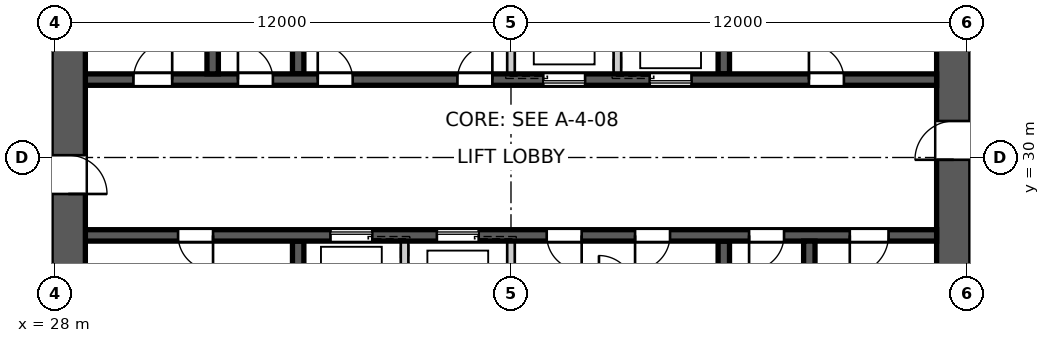
"""IFC4 building model, lengths in metres.
Left out: names, types, materials, properties, quantities, classifications, styles, units other than length and angle.
Written with IfcOpenShell. Run it as: python <this file> out.ifc"""

import sys

from ifc_helpers import new_model, si_unit, direction, frame, frame_2d, origin, place, context, subcontext, project, spatial, polyline, rectangle, outline, extrude, element, fill, save


model = new_model("IFC4")
c1 = context("Model", 3, precision=1e-05, world=origin(), true_north=direction((0.0, 1.0)))
c2 = subcontext(c1, "Body", "Model", "MODEL_VIEW")
j1 = project(units=[si_unit("LENGTHUNIT", "METRE"), si_unit("PLANEANGLEUNIT", "RADIAN")], contexts=[c1])
p1 = place(None, origin())
s1 = spatial("IfcSite", under=j1, at=p1, CompositionType="ELEMENT")
p2 = place(p1, origin())
s2 = spatial("IfcBuilding", under=s1, at=p2, CompositionType="ELEMENT")
p3 = place(p2, frame((0.0, 0.0, 264.2)))
s3 = spatial("IfcBuildingStorey", under=s2, at=p3, CompositionType="ELEMENT", Elevation=264.2)
p4 = place(p3, frame((51.65, 18.8, 0.0), z_axis=(0.0, 0.0, 1.0), x_axis=(0.0, 1.0, 0.0)))
e1 = element("IfcWall", 1, at=p4, inside=s3, PredefinedType="SHEAR", context=c2, shape_type="SweptSolid", body=[
    extrude(outline(polyline([(0.0, -0.45), (22.4, -0.45), (22.4, -0.025), (22.85, -0.025), (22.85, 0.025), (22.4, 0.025), (22.4, 0.45), (0.0, 0.45), (0.0, 0.025), (-0.45, 0.025), (-0.45, -0.025), (0.0, -0.025), (0.0, -0.45)])), origin(), (0.0, 0.0, 1.0), 3.4),
])
p5 = place(p4, frame((11.14, 0.0, 0.0)))
e2 = element("IfcOpeningElement", 2, at=p5, cuts=e1, PredefinedType="OPENING", context=c2, shape_type="SweptSolid", body=[
    extrude(rectangle(XDim=1.02, YDim=2.4, at=frame_2d((0.51, 1.2))), frame((0.0, 0.46, 0.0), z_axis=(0.0, -1.0, 0.0), x_axis=(1.0, 0.0, 0.0)), (0.0, 0.0, 1.0), 0.92),
])
p6 = place(p3, frame((28.35, 41.2, 0.0), z_axis=(0.0, 0.0, 1.0), x_axis=(0.0, -1.0, 0.0)))
e3 = element("IfcWall", 3, at=p6, inside=s3, PredefinedType="SHEAR", context=c2, shape_type="SweptSolid", body=[
    extrude(outline(polyline([(0.0, -0.45), (22.4, -0.45), (22.4, -0.025), (22.85, -0.025), (22.85, 0.025), (22.4, 0.025), (22.4, 0.45), (0.0, 0.45), (0.0, 0.025), (-0.45, 0.025), (-0.45, -0.025), (0.0, -0.025), (0.0, -0.45)])), origin(), (0.0, 0.0, 1.0), 3.4),
])
p7 = place(p6, frame((11.14, 0.0, 0.0)))
e4 = element("IfcOpeningElement", 4, at=p7, cuts=e3, PredefinedType="OPENING", context=c2, shape_type="SweptSolid", body=[
    extrude(rectangle(XDim=1.02, YDim=2.4, at=frame_2d((0.51, 1.2))), frame((0.0, 0.46, 0.0), z_axis=(0.0, -1.0, 0.0), x_axis=(1.0, 0.0, 0.0)), (0.0, 0.0, 1.0), 0.92),
])
p8 = place(p3, frame((28.8, 32.05, 0.0), z_axis=(0.0, 0.0, 1.0), x_axis=(1.0, 0.0, 0.0)))
e5 = element("IfcWall", 5, at=p8, inside=s3, PredefinedType="SHEAR", context=c2, shape_type="SweptSolid", body=[
    extrude(rectangle(XDim=22.4, YDim=0.3, at=frame_2d((11.2, 0.0))), origin(), (0.0, 0.0, 1.0), 3.4),
])
p9 = place(p8, frame((19.04, 0.0, 0.0)))
e6 = element("IfcOpeningElement", 6, at=p9, cuts=e5, PredefinedType="OPENING", context=c2, shape_type="SweptSolid", body=[
    extrude(rectangle(XDim=0.92, YDim=2.1, at=frame_2d((0.46, 1.05))), frame((0.0, 0.16, 0.0), z_axis=(0.0, -1.0, 0.0), x_axis=(1.0, 0.0, 0.0)), (0.0, 0.0, 1.0), 0.32),
])
p10 = place(p8, frame((1.265, 0.0, 0.0)))
e7 = element("IfcOpeningElement", 7, at=p10, cuts=e5, PredefinedType="OPENING", context=c2, shape_type="SweptSolid", body=[
    extrude(rectangle(XDim=1.02, YDim=2.1, at=frame_2d((0.51, 1.05))), frame((0.0, 0.16, 0.0), z_axis=(0.0, -1.0, 0.0), x_axis=(1.0, 0.0, 0.0)), (0.0, 0.0, 1.0), 0.32),
])
p11 = place(p8, frame((4.015, 0.0, 0.0)))
e8 = element("IfcOpeningElement", 8, at=p11, cuts=e5, PredefinedType="OPENING", context=c2, shape_type="SweptSolid", body=[
    extrude(rectangle(XDim=0.92, YDim=2.1, at=frame_2d((0.46, 1.05))), frame((0.0, 0.16, 0.0), z_axis=(0.0, -1.0, 0.0), x_axis=(1.0, 0.0, 0.0)), (0.0, 0.0, 1.0), 0.32),
])
p12 = place(p8, frame((6.115, 0.0, 0.0)))
e9 = element("IfcOpeningElement", 9, at=p12, cuts=e5, PredefinedType="OPENING", context=c2, shape_type="SweptSolid", body=[
    extrude(rectangle(XDim=0.92, YDim=2.1, at=frame_2d((0.46, 1.05))), frame((0.0, 0.16, 0.0), z_axis=(0.0, -1.0, 0.0), x_axis=(1.0, 0.0, 0.0)), (0.0, 0.0, 1.0), 0.32),
])
p13 = place(p8, frame((9.79, 0.0, 0.0)))
e10 = element("IfcOpeningElement", 10, at=p13, cuts=e5, PredefinedType="OPENING", context=c2, shape_type="SweptSolid", body=[
    extrude(rectangle(XDim=0.92, YDim=2.1, at=frame_2d((0.46, 1.05))), frame((0.0, 0.16, 0.0), z_axis=(0.0, -1.0, 0.0), x_axis=(1.0, 0.0, 0.0)), (0.0, 0.0, 1.0), 0.32),
])
p14 = place(p8, frame((12.05, 0.0, 0.0)))
e11 = element("IfcOpeningElement", 11, at=p14, cuts=e5, PredefinedType="OPENING", context=c2, shape_type="SweptSolid", body=[
    extrude(rectangle(XDim=1.1, YDim=2.1, at=frame_2d((0.55, 1.05))), frame((0.0, 0.16, 0.0), z_axis=(0.0, -1.0, 0.0), x_axis=(1.0, 0.0, 0.0)), (0.0, 0.0, 1.0), 0.32),
])
p15 = place(p8, frame((14.85, 0.0, 0.0)))
e12 = element("IfcOpeningElement", 12, at=p15, cuts=e5, PredefinedType="OPENING", context=c2, shape_type="SweptSolid", body=[
    extrude(rectangle(XDim=1.1, YDim=2.1, at=frame_2d((0.55, 1.05))), frame((0.0, 0.16, 0.0), z_axis=(0.0, -1.0, 0.0), x_axis=(1.0, 0.0, 0.0)), (0.0, 0.0, 1.0), 0.32),
])
p16 = place(p3, frame((51.2, 27.95, 0.0), z_axis=(0.0, 0.0, 1.0), x_axis=(-1.0, 0.0, 0.0)))
e13 = element("IfcWall", 13, at=p16, inside=s3, PredefinedType="SHEAR", context=c2, shape_type="SweptSolid", body=[
    extrude(rectangle(XDim=22.4, YDim=0.3, at=frame_2d((11.2, 0.0))), origin(), (0.0, 0.0, 1.0), 3.4),
])
p17 = place(p16, frame((19.04, 0.0, 0.0)))
e14 = element("IfcOpeningElement", 14, at=p17, cuts=e13, PredefinedType="OPENING", context=c2, shape_type="SweptSolid", body=[
    extrude(rectangle(XDim=0.92, YDim=2.1, at=frame_2d((0.46, 1.05))), frame((0.0, 0.16, 0.0), z_axis=(0.0, -1.0, 0.0), x_axis=(1.0, 0.0, 0.0)), (0.0, 0.0, 1.0), 0.32),
])
p18 = place(p16, frame((1.265, 0.0, 0.0)))
e15 = element("IfcOpeningElement", 15, at=p18, cuts=e13, PredefinedType="OPENING", context=c2, shape_type="SweptSolid", body=[
    extrude(rectangle(XDim=1.02, YDim=2.1, at=frame_2d((0.51, 1.05))), frame((0.0, 0.16, 0.0), z_axis=(0.0, -1.0, 0.0), x_axis=(1.0, 0.0, 0.0)), (0.0, 0.0, 1.0), 0.32),
])
p19 = place(p16, frame((4.015, 0.0, 0.0)))
e16 = element("IfcOpeningElement", 16, at=p19, cuts=e13, PredefinedType="OPENING", context=c2, shape_type="SweptSolid", body=[
    extrude(rectangle(XDim=0.92, YDim=2.1, at=frame_2d((0.46, 1.05))), frame((0.0, 0.16, 0.0), z_axis=(0.0, -1.0, 0.0), x_axis=(1.0, 0.0, 0.0)), (0.0, 0.0, 1.0), 0.32),
])
p20 = place(p16, frame((9.34, 0.0, 0.0)))
e17 = element("IfcOpeningElement", 17, at=p20, cuts=e13, PredefinedType="OPENING", context=c2, shape_type="SweptSolid", body=[
    extrude(rectangle(XDim=0.92, YDim=2.1, at=frame_2d((0.46, 1.05))), frame((0.0, 0.16, 0.0), z_axis=(0.0, -1.0, 0.0), x_axis=(1.0, 0.0, 0.0)), (0.0, 0.0, 1.0), 0.32),
])
p21 = place(p16, frame((7.015, 0.0, 0.0)))
e18 = element("IfcOpeningElement", 18, at=p21, cuts=e13, PredefinedType="OPENING", context=c2, shape_type="SweptSolid", body=[
    extrude(rectangle(XDim=0.92, YDim=2.1, at=frame_2d((0.46, 1.05))), frame((0.0, 0.16, 0.0), z_axis=(0.0, -1.0, 0.0), x_axis=(1.0, 0.0, 0.0)), (0.0, 0.0, 1.0), 0.32),
])
p22 = place(p16, frame((12.05, 0.0, 0.0)))
e19 = element("IfcOpeningElement", 19, at=p22, cuts=e13, PredefinedType="OPENING", context=c2, shape_type="SweptSolid", body=[
    extrude(rectangle(XDim=1.1, YDim=2.1, at=frame_2d((0.55, 1.05))), frame((0.0, 0.16, 0.0), z_axis=(0.0, -1.0, 0.0), x_axis=(1.0, 0.0, 0.0)), (0.0, 0.0, 1.0), 0.32),
])
p23 = place(p16, frame((14.85, 0.0, 0.0)))
e20 = element("IfcOpeningElement", 20, at=p23, cuts=e13, PredefinedType="OPENING", context=c2, shape_type="SweptSolid", body=[
    extrude(rectangle(XDim=1.1, YDim=2.1, at=frame_2d((0.55, 1.05))), frame((0.0, 0.16, 0.0), z_axis=(0.0, -1.0, 0.0), x_axis=(1.0, 0.0, 0.0)), (0.0, 0.0, 1.0), 0.32),
])
for number, where, z_axis, x_axis in (
    (21, (34.4, 32.2, 0.0), (0.0, 0.0, 1.0), (0.0, 1.0, 0.0)),
    (22, (45.6, 27.8, 0.0), (0.0, 0.0, 1.0), (0.0, -1.0, 0.0)),
):
    element("IfcWall", number, at=place(p3, frame(where, z_axis=z_axis, x_axis=x_axis)), inside=s3, PredefinedType="SHEAR", context=c2, shape_type="SweptSolid", body=[
        extrude(rectangle(XDim=2.8, YDim=0.3, at=frame_2d((1.4, 0.0))), origin(), (0.0, 0.0, 1.0), 3.4),
    ])
for number, where, z_axis, x_axis in (
    (23, (40.0, 32.2, 0.0), (0.0, 0.0, 1.0), (0.0, 1.0, 0.0)),
    (24, (40.0, 27.8, 0.0), (0.0, 0.0, 1.0), (0.0, -1.0, 0.0)),
    (25, (42.8, 32.2, 0.0), (0.0, 0.0, 1.0), (0.0, 1.0, 0.0)),
    (26, (37.2, 27.8, 0.0), (0.0, 0.0, 1.0), (0.0, -1.0, 0.0)),
):
    element("IfcWall", number, at=place(p3, frame(where, z_axis=z_axis, x_axis=x_axis)), inside=s3, PredefinedType="SOLIDWALL", context=c2, shape_type="SweptSolid", body=[
        extrude(rectangle(XDim=2.8, YDim=0.2, at=frame_2d((1.4, 0.0))), origin(), (0.0, 0.0, 1.0), 3.4),
    ])
for number, where, z_axis, x_axis in (
    (27, (45.6, 32.2, 0.0), (0.0, 0.0, 1.0), (0.0, 1.0, 0.0)),
    (28, (34.4, 27.8, 0.0), (0.0, 0.0, 1.0), (0.0, -1.0, 0.0)),
):
    element("IfcWall", number, at=place(p3, frame(where, z_axis=z_axis, x_axis=x_axis)), inside=s3, PredefinedType="SHEAR", context=c2, shape_type="SweptSolid", body=[
        extrude(rectangle(XDim=2.8, YDim=0.3, at=frame_2d((1.4, 0.0))), origin(), (0.0, 0.0, 1.0), 3.4),
    ])
for number, where, z_axis, x_axis in (
    (29, (32.15, 32.2, 0.0), (0.0, 0.0, 1.0), (0.0, 1.0, 0.0)),
    (30, (47.85, 27.8, 0.0), (0.0, 0.0, 1.0), (0.0, -1.0, 0.0)),
):
    element("IfcWall", number, at=place(p3, frame(where, z_axis=z_axis, x_axis=x_axis)), inside=s3, PredefinedType="SHEAR", context=c2, shape_type="SweptSolid", body=[
        extrude(rectangle(XDim=7.7, YDim=0.3, at=frame_2d((3.85, 0.0))), origin(), (0.0, 0.0, 1.0), 3.4),
    ])
p24 = place(p9, origin())
e31 = element("IfcDoor", 31, at=p24, inside=s3, OperationType="SINGLE_SWING_LEFT", PredefinedType="DOOR", context=c2, shape_type="SweptSolid", body=[
    extrude(rectangle(XDim=0.92, YDim=2.1, at=frame_2d((0.46, 1.05))), frame((0.0, 0.025, 0.0), z_axis=(0.0, -1.0, 0.0), x_axis=(1.0, 0.0, 0.0)), (0.0, 0.0, 1.0), 0.05),
])
fill(e6, e31)
p25 = place(p17, origin())
e32 = element("IfcDoor", 32, at=p25, inside=s3, OperationType="SINGLE_SWING_LEFT", PredefinedType="DOOR", context=c2, shape_type="SweptSolid", body=[
    extrude(rectangle(XDim=0.92, YDim=2.1, at=frame_2d((0.46, 1.05))), frame((0.0, 0.025, 0.0), z_axis=(0.0, -1.0, 0.0), x_axis=(1.0, 0.0, 0.0)), (0.0, 0.0, 1.0), 0.05),
])
fill(e14, e32)
p26 = place(p18, origin())
e33 = element("IfcDoor", 33, at=p26, inside=s3, OperationType="SINGLE_SWING_RIGHT", PredefinedType="DOOR", context=c2, shape_type="SweptSolid", body=[
    extrude(rectangle(XDim=1.02, YDim=2.1, at=frame_2d((0.51, 1.05))), frame((0.0, 0.025, 0.0), z_axis=(0.0, -1.0, 0.0), x_axis=(1.0, 0.0, 0.0)), (0.0, 0.0, 1.0), 0.05),
])
fill(e15, e33)
p27 = place(p10, origin())
e34 = element("IfcDoor", 34, at=p27, inside=s3, OperationType="SINGLE_SWING_RIGHT", PredefinedType="DOOR", context=c2, shape_type="SweptSolid", body=[
    extrude(rectangle(XDim=1.02, YDim=2.1, at=frame_2d((0.51, 1.05))), frame((0.0, 0.025, 0.0), z_axis=(0.0, -1.0, 0.0), x_axis=(1.0, 0.0, 0.0)), (0.0, 0.0, 1.0), 0.05),
])
fill(e7, e34)
p28 = place(p11, origin())
e35 = element("IfcDoor", 35, at=p28, inside=s3, OperationType="SINGLE_SWING_LEFT", PredefinedType="DOOR", context=c2, shape_type="SweptSolid", body=[
    extrude(rectangle(XDim=0.92, YDim=2.1, at=frame_2d((0.46, 1.05))), frame((0.0, 0.025, 0.0), z_axis=(0.0, -1.0, 0.0), x_axis=(1.0, 0.0, 0.0)), (0.0, 0.0, 1.0), 0.05),
])
fill(e8, e35)
p29 = place(p19, origin())
e36 = element("IfcDoor", 36, at=p29, inside=s3, OperationType="SINGLE_SWING_RIGHT", PredefinedType="DOOR", context=c2, shape_type="SweptSolid", body=[
    extrude(rectangle(XDim=0.92, YDim=2.1, at=frame_2d((0.46, 1.05))), frame((0.0, 0.025, 0.0), z_axis=(0.0, -1.0, 0.0), x_axis=(1.0, 0.0, 0.0)), (0.0, 0.0, 1.0), 0.05),
])
fill(e16, e36)
p30 = place(p12, origin())
e37 = element("IfcDoor", 37, at=p30, inside=s3, OperationType="SINGLE_SWING_LEFT", PredefinedType="DOOR", context=c2, shape_type="SweptSolid", body=[
    extrude(rectangle(XDim=0.92, YDim=2.1, at=frame_2d((0.46, 1.05))), frame((0.0, 0.025, 0.0), z_axis=(0.0, -1.0, 0.0), x_axis=(1.0, 0.0, 0.0)), (0.0, 0.0, 1.0), 0.05),
])
fill(e9, e37)
p31 = place(p13, origin())
e38 = element("IfcDoor", 38, at=p31, inside=s3, OperationType="SINGLE_SWING_RIGHT", PredefinedType="DOOR", context=c2, shape_type="SweptSolid", body=[
    extrude(rectangle(XDim=0.92, YDim=2.1, at=frame_2d((0.46, 1.05))), frame((0.0, 0.025, 0.0), z_axis=(0.0, -1.0, 0.0), x_axis=(1.0, 0.0, 0.0)), (0.0, 0.0, 1.0), 0.05),
])
fill(e10, e38)
p32 = place(p20, origin())
e39 = element("IfcDoor", 39, at=p32, inside=s3, OperationType="SINGLE_SWING_LEFT", PredefinedType="DOOR", context=c2, shape_type="SweptSolid", body=[
    extrude(rectangle(XDim=0.92, YDim=2.1, at=frame_2d((0.46, 1.05))), frame((0.0, 0.025, 0.0), z_axis=(0.0, -1.0, 0.0), x_axis=(1.0, 0.0, 0.0)), (0.0, 0.0, 1.0), 0.05),
])
fill(e17, e39)
p33 = place(p21, origin())
e40 = element("IfcDoor", 40, at=p33, inside=s3, OperationType="SINGLE_SWING_RIGHT", PredefinedType="DOOR", context=c2, shape_type="SweptSolid", body=[
    extrude(rectangle(XDim=0.92, YDim=2.1, at=frame_2d((0.46, 1.05))), frame((0.0, 0.025, 0.0), z_axis=(0.0, -1.0, 0.0), x_axis=(1.0, 0.0, 0.0)), (0.0, 0.0, 1.0), 0.05),
])
fill(e18, e40)
p34 = place(p5, origin())
e41 = element("IfcDoor", 41, at=p34, inside=s3, OperationType="SINGLE_SWING_LEFT", PredefinedType="DOOR", context=c2, shape_type="SweptSolid", body=[
    extrude(rectangle(XDim=1.02, YDim=2.4, at=frame_2d((0.51, 1.2))), frame((0.0, 0.025, 0.0), z_axis=(0.0, -1.0, 0.0), x_axis=(1.0, 0.0, 0.0)), (0.0, 0.0, 1.0), 0.05),
])
fill(e2, e41)
p35 = place(p7, origin())
e42 = element("IfcDoor", 42, at=p35, inside=s3, OperationType="SINGLE_SWING_RIGHT", PredefinedType="DOOR", context=c2, shape_type="SweptSolid", body=[
    extrude(rectangle(XDim=1.02, YDim=2.4, at=frame_2d((0.51, 1.2))), frame((0.0, 0.025, 0.0), z_axis=(0.0, -1.0, 0.0), x_axis=(1.0, 0.0, 0.0)), (0.0, 0.0, 1.0), 0.05),
])
fill(e4, e42)
p36 = place(p14, origin())
e43 = element("IfcDoor", 43, at=p36, inside=s3, OperationType="SLIDING_TO_LEFT", PredefinedType="DOOR", context=c2, shape_type="SweptSolid", body=[
    extrude(rectangle(XDim=1.1, YDim=2.1, at=frame_2d((0.55, 1.05))), frame((0.0, 0.025, 0.0), z_axis=(0.0, -1.0, 0.0), x_axis=(1.0, 0.0, 0.0)), (0.0, 0.0, 1.0), 0.05),
])
fill(e11, e43)
p37 = place(p22, origin())
e44 = element("IfcDoor", 44, at=p37, inside=s3, OperationType="SLIDING_TO_LEFT", PredefinedType="DOOR", context=c2, shape_type="SweptSolid", body=[
    extrude(rectangle(XDim=1.1, YDim=2.1, at=frame_2d((0.55, 1.05))), frame((0.0, 0.025, 0.0), z_axis=(0.0, -1.0, 0.0), x_axis=(1.0, 0.0, 0.0)), (0.0, 0.0, 1.0), 0.05),
])
fill(e19, e44)
p38 = place(p15, origin())
e45 = element("IfcDoor", 45, at=p38, inside=s3, OperationType="SLIDING_TO_LEFT", PredefinedType="DOOR", context=c2, shape_type="SweptSolid", body=[
    extrude(rectangle(XDim=1.1, YDim=2.1, at=frame_2d((0.55, 1.05))), frame((0.0, 0.025, 0.0), z_axis=(0.0, -1.0, 0.0), x_axis=(1.0, 0.0, 0.0)), (0.0, 0.0, 1.0), 0.05),
])
fill(e12, e45)
p39 = place(p23, origin())
e46 = element("IfcDoor", 46, at=p39, inside=s3, OperationType="SLIDING_TO_LEFT", PredefinedType="DOOR", context=c2, shape_type="SweptSolid", body=[
    extrude(rectangle(XDim=1.1, YDim=2.1, at=frame_2d((0.55, 1.05))), frame((0.0, 0.025, 0.0), z_axis=(0.0, -1.0, 0.0), x_axis=(1.0, 0.0, 0.0)), (0.0, 0.0, 1.0), 0.05),
])
fill(e20, e46)
save(model, sys.argv[1])
